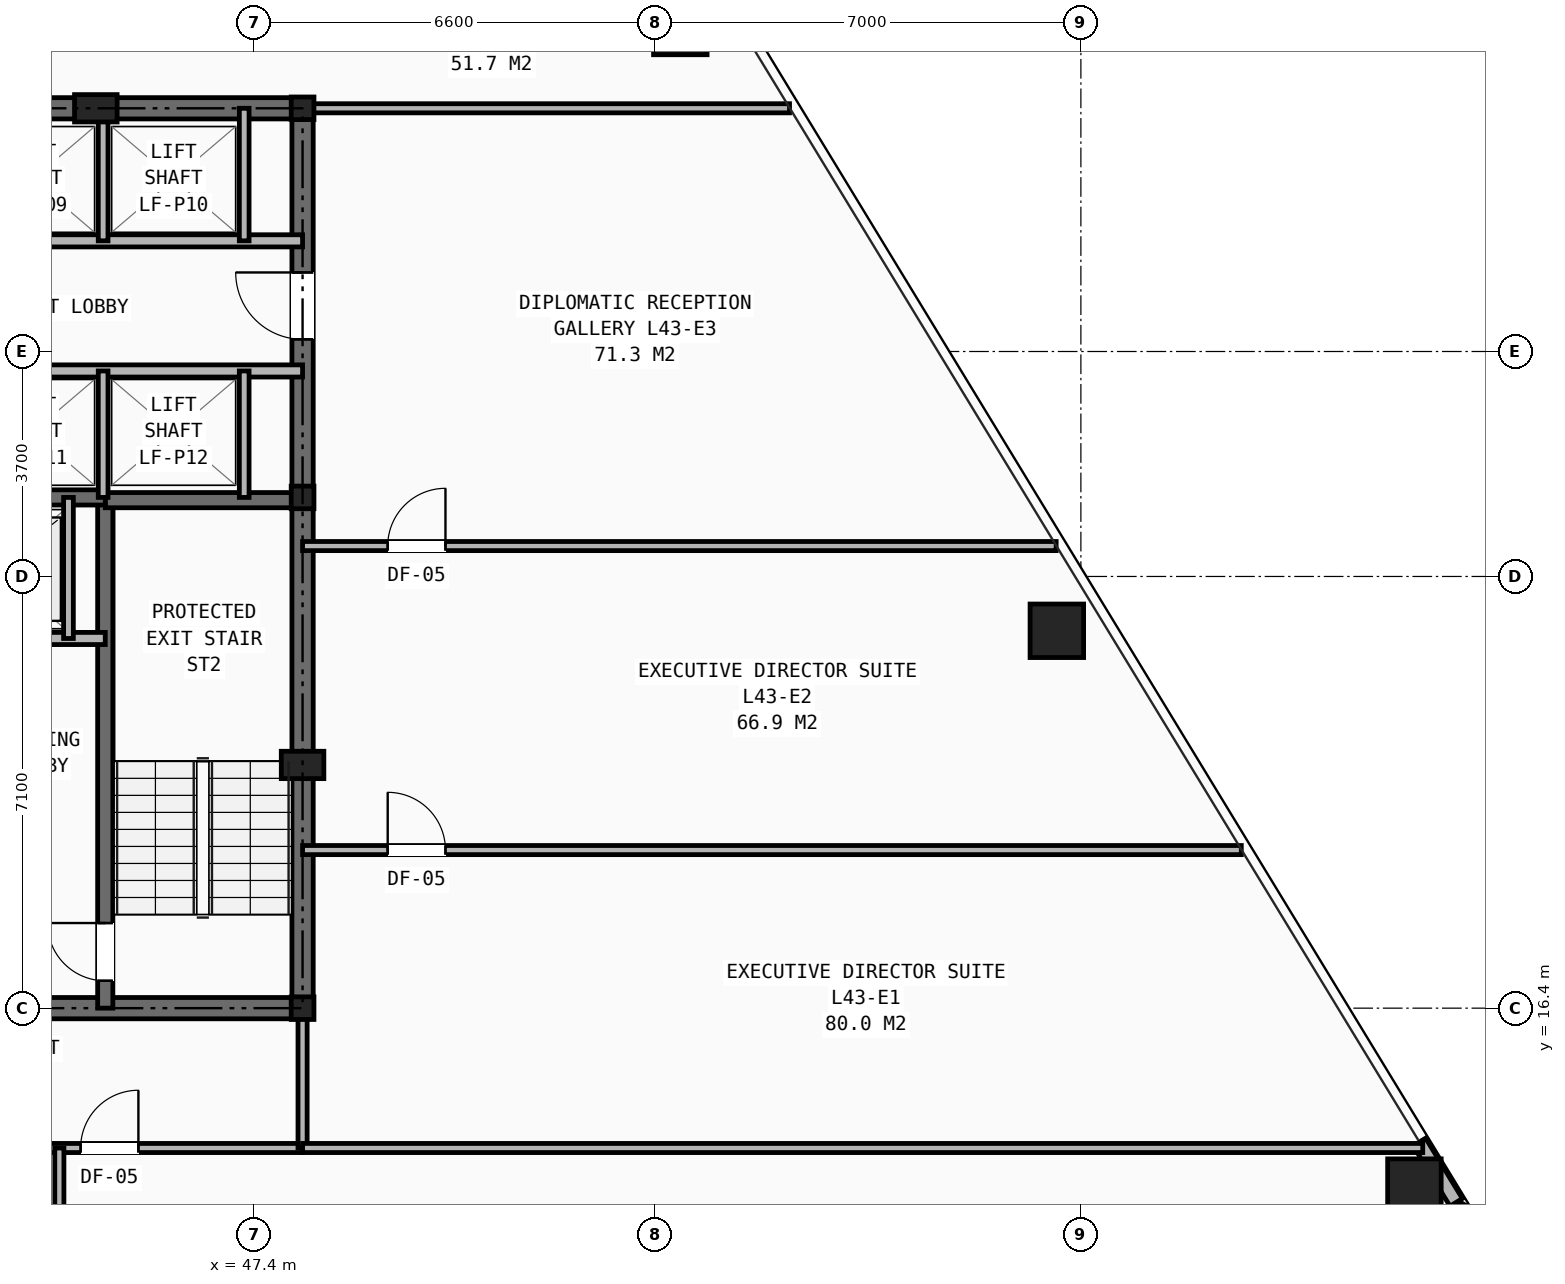
"""IFC4 building model, lengths in metres.
Left out: names, types, materials, properties, quantities, classifications, styles, units other than length and angle.
Written with IfcOpenShell. Run it as: python <this file> out.ifc"""

import sys

from ifc_helpers import new_model, si_unit, direction, frame, frame_2d, origin, origin_2d, place, context, subcontext, project, spatial, rectangle, hollow_rectangle, i_section, extrude, element, fill, save


model = new_model("IFC4")
c1 = context("Model", 3, precision=1e-05, world=origin(), true_north=direction((0.0, 1.0)))
c2 = subcontext(c1, "Body", "Model", "MODEL_VIEW")
j1 = project(units=[si_unit("LENGTHUNIT", "METRE"), si_unit("PLANEANGLEUNIT", "RADIAN")], contexts=[c1])
p1 = place(None, origin())
s1 = spatial("IfcSite", under=j1, at=p1, CompositionType="ELEMENT")
p2 = place(p1, origin())
s2 = spatial("IfcBuilding", under=s1, at=p2, CompositionType="ELEMENT")
p3 = place(p2, frame((0.0, 0.0, 150.5)))
s3 = spatial("IfcBuildingStorey", under=s2, at=p3, CompositionType="ELEMENT", Elevation=150.5)
for number, where, z_axis, x_axis in (
    (1, (48.2, 16.4, 0.0), (0.0, 0.0, 1.0), (1.0, 0.0, 0.0)),
    (2, (48.2, 24.8, 0.0), (0.0, 0.0, 1.0), (1.0, 0.0, 0.0)),
    (3, (48.2, 31.2, 0.0), (0.0, 0.0, 1.0), (1.0, 0.0, 0.0)),
):
    element("IfcColumn", number, at=place(p3, frame(where, z_axis=z_axis, x_axis=x_axis)), inside=s3, PredefinedType="COLUMN", context=c2, shape_type="SweptSolid", body=[
        extrude(i_section(OverallWidth=0.374, OverallDepth=0.372, WebThickness=0.016, FlangeThickness=0.026, at=origin_2d()), origin(), (0.0, 0.0, 1.0), 3.45),
    ])
for number, where, z_axis, x_axis in (
    (4, (48.2, 20.4, 0.0), (0.0, 0.0, 1.0), (1.0, 0.0, 0.0)),
    (5, (44.8, 31.2, 0.0), (0.0, 0.0, 1.0), (1.0, 0.0, 0.0)),
):
    element("IfcColumn", number, at=place(p3, frame(where, z_axis=z_axis, x_axis=x_axis)), inside=s3, PredefinedType="PILASTER", context=c2, shape_type="SweptSolid", body=[
        extrude(rectangle(XDim=0.7, YDim=0.45, at=origin_2d()), origin(), (0.0, 0.0, 1.0), 3.45),
    ])
for number, where, z_axis, x_axis in (
    (6, (66.485, 13.481, 0.0), (0.0, 0.0, 1.0), (1.0, 0.0, 0.0)),
    (7, (60.604, 22.606, 0.0), (0.0, 0.0, 1.0), (1.0, 0.0, 0.0)),
    (8, (54.412, 32.521, 0.0), (0.0, 0.0, 1.0), (1.0, 0.0, 0.0)),
):
    element("IfcColumn", number, at=place(p3, frame(where, z_axis=z_axis, x_axis=x_axis)), inside=s3, PredefinedType="COLUMN", context=c2, shape_type="SweptSolid", body=[
        extrude(hollow_rectangle(XDim=0.88, YDim=0.88, WallThickness=0.06, at=origin_2d()), origin(), (0.0, 0.0, 1.0), 3.45),
    ])
p4 = place(p3, frame((67.285, 13.181, 0.0), z_axis=(0.0, 0.0, 1.0), x_axis=(-0.49999135188, -0.866030396721, 0.0)))
e9 = element("IfcWall", 9, at=p4, inside=s3, PredefinedType="SHEAR", context=c2, shape_type="SweptSolid", body=[
    extrude(rectangle(XDim=8.2, YDim=0.24, at=frame_2d((4.1, 0.0))), origin(), (0.0, 0.0, 1.0), 2.583),
])
p5 = place(p3, frame((67.172, 13.206, 0.0), z_axis=(0.0, 0.0, 1.0), x_axis=(-0.520166776588, 0.854064707463, 0.0)))
e10 = element("IfcWall", 10, at=p5, inside=s3, PredefinedType="SHEAR", context=c2, shape_type="SweptSolid", body=[
    extrude(rectangle(XDim=1.163, YDim=0.24, at=frame_2d((0.581, 0.0))), origin(), (0.0, 0.0, 1.0), 2.583),
])
p6 = place(p3, frame((31.8, 16.4, 0.0), z_axis=(0.0, 0.0, 1.0), x_axis=(1.0, 0.0, 0.0)))
e11 = element("IfcWall", 11, at=p6, inside=s3, PredefinedType="SHEAR", context=c2, shape_type="SweptSolid", body=[
    extrude(rectangle(XDim=16.4, YDim=0.35, at=frame_2d((8.2, 0.0))), origin(), (0.0, 0.0, 1.0), 3.21),
])
p7 = place(p6, frame((7.75, 0.0, 0.0)))
e12 = element("IfcOpeningElement", 12, at=p7, cuts=e11, PredefinedType="OPENING", context=c2, shape_type="SweptSolid", body=[
    extrude(rectangle(XDim=0.9, YDim=2.1, at=frame_2d((0.45, 1.05))), frame((0.0, 0.185, 0.0), z_axis=(0.0, -1.0, 0.0), x_axis=(1.0, 0.0, 0.0)), (0.0, 0.0, 1.0), 0.37),
])
p8 = place(p6, frame((4.2, 0.0, 0.0)))
e13 = element("IfcOpeningElement", 13, at=p8, cuts=e11, PredefinedType="OPENING", context=c2, shape_type="SweptSolid", body=[
    extrude(rectangle(XDim=0.95, YDim=2.1, at=frame_2d((0.475, 1.05))), frame((0.0, 0.185, 0.0), z_axis=(0.0, -1.0, 0.0), x_axis=(1.0, 0.0, 0.0)), (0.0, 0.0, 1.0), 0.37),
])
p9 = place(p6, frame((10.6, 0.0, 0.0)))
e14 = element("IfcOpeningElement", 14, at=p9, cuts=e11, PredefinedType="OPENING", context=c2, shape_type="SweptSolid", body=[
    extrude(rectangle(XDim=0.95, YDim=2.1, at=frame_2d((0.475, 1.05))), frame((0.0, 0.185, 0.0), z_axis=(0.0, -1.0, 0.0), x_axis=(1.0, 0.0, 0.0)), (0.0, 0.0, 1.0), 0.37),
])
p10 = place(p3, frame((31.8, 31.2, 0.0), z_axis=(0.0, 0.0, 1.0), x_axis=(1.0, 0.0, 0.0)))
e15 = element("IfcWall", 15, at=p10, inside=s3, PredefinedType="SHEAR", context=c2, shape_type="SweptSolid", body=[
    extrude(rectangle(XDim=16.4, YDim=0.35, at=frame_2d((8.2, 0.0))), origin(), (0.0, 0.0, 1.0), 3.21),
])
p11 = place(p3, frame((48.2, 16.4, 0.0), z_axis=(0.0, 0.0, 1.0), x_axis=(0.0, 1.0, 0.0)))
e16 = element("IfcWall", 16, at=p11, inside=s3, PredefinedType="SHEAR", context=c2, shape_type="SweptSolid", body=[
    extrude(rectangle(XDim=14.8, YDim=0.35, at=frame_2d((7.4, 0.0))), origin(), (0.0, 0.0, 1.0), 3.21),
])
p12 = place(p11, frame((11.0, 0.0, 0.0)))
e17 = element("IfcOpeningElement", 17, at=p12, cuts=e16, PredefinedType="OPENING", context=c2, shape_type="SweptSolid", body=[
    extrude(rectangle(XDim=1.1, YDim=2.15, at=frame_2d((0.55, 1.075))), frame((0.0, 0.185, 0.0), z_axis=(0.0, -1.0, 0.0), x_axis=(1.0, 0.0, 0.0)), (0.0, 0.0, 1.0), 0.37),
])
p13 = place(p3, frame((44.955, 16.4, 0.0), z_axis=(0.0, 0.0, 1.0), x_axis=(0.0, 1.0, 0.0)))
e18 = element("IfcWall", 18, at=p13, inside=s3, PredefinedType="SHEAR", context=c2, shape_type="SweptSolid", body=[
    extrude(rectangle(XDim=8.4, YDim=0.25, at=frame_2d((4.2, 0.0))), origin(), (0.0, 0.0, 1.0), 3.21),
])
p14 = place(p13, frame((0.45, 0.0, 0.0)))
e19 = element("IfcOpeningElement", 19, at=p14, cuts=e18, PredefinedType="OPENING", context=c2, shape_type="SweptSolid", body=[
    extrude(rectangle(XDim=0.95, YDim=2.1, at=frame_2d((0.475, 1.05))), frame((0.0, 0.135, 0.0), z_axis=(0.0, -1.0, 0.0), x_axis=(1.0, 0.0, 0.0)), (0.0, 0.0, 1.0), 0.27),
])
p15 = place(p3, frame((44.955, 24.755, 0.0), z_axis=(0.0, 0.0, 1.0), x_axis=(1.0, 0.0, 0.0)))
e20 = element("IfcWall", 20, at=p15, inside=s3, PredefinedType="SHEAR", context=c2, shape_type="SweptSolid", body=[
    extrude(rectangle(XDim=3.245, YDim=0.25, at=frame_2d((1.623, 0.0))), origin(), (0.0, 0.0, 1.0), 3.21),
])
p16 = place(p3, frame((35.045, 24.8, 0.0), z_axis=(0.0, 0.0, 1.0), x_axis=(1.0, 0.0, 0.0)))
e21 = element("IfcWall", 21, at=p16, inside=s3, PredefinedType="SHEAR", context=c2, shape_type="SweptSolid", body=[
    extrude(rectangle(XDim=9.91, YDim=0.25, at=frame_2d((4.955, 0.0))), origin(), (0.0, 0.0, 1.0), 3.21),
])
p17 = place(p3, frame((35.045, 22.48, 0.0), z_axis=(0.0, 0.0, 1.0), x_axis=(1.0, 0.0, 0.0)))
e22 = element("IfcWall", 22, at=p17, inside=s3, PredefinedType="SOLIDWALL", context=c2, shape_type="SweptSolid", body=[
    extrude(rectangle(XDim=9.91, YDim=0.2, at=frame_2d((4.955, 0.0))), origin(), (0.0, 0.0, 1.0), 3.21),
])
p18 = place(p17, frame((1.255, 0.0, 0.0)))
e23 = element("IfcOpeningElement", 23, at=p18, cuts=e22, PredefinedType="OPENING", context=c2, shape_type="SweptSolid", body=[
    extrude(rectangle(XDim=1.1, YDim=2.15, at=frame_2d((0.55, 1.075))), frame((0.0, 0.11, 0.0), z_axis=(0.0, -1.0, 0.0), x_axis=(1.0, 0.0, 0.0)), (0.0, 0.0, 1.0), 0.22),
])
p19 = place(p17, frame((7.555, 0.0, 0.0)))
e24 = element("IfcOpeningElement", 24, at=p19, cuts=e22, PredefinedType="OPENING", context=c2, shape_type="SweptSolid", body=[
    extrude(rectangle(XDim=1.1, YDim=2.15, at=frame_2d((0.55, 1.075))), frame((0.0, 0.11, 0.0), z_axis=(0.0, -1.0, 0.0), x_axis=(1.0, 0.0, 0.0)), (0.0, 0.0, 1.0), 0.22),
])
p20 = place(p17, frame((4.405, 0.0, 0.0)))
e25 = element("IfcOpeningElement", 25, at=p20, cuts=e22, PredefinedType="OPENING", context=c2, shape_type="SweptSolid", body=[
    extrude(rectangle(XDim=1.1, YDim=2.15, at=frame_2d((0.55, 1.075))), frame((0.0, 0.11, 0.0), z_axis=(0.0, -1.0, 0.0), x_axis=(1.0, 0.0, 0.0)), (0.0, 0.0, 1.0), 0.22),
])
p21 = place(p3, frame((44.35, 22.48, 0.0), z_axis=(0.0, 0.0, 1.0), x_axis=(0.0, 1.0, 0.0)))
e26 = element("IfcWall", 26, at=p21, inside=s3, PredefinedType="SOLIDWALL", context=c2, shape_type="SweptSolid", body=[
    extrude(rectangle(XDim=2.32, YDim=0.16, at=frame_2d((1.16, 0.0))), origin(), (0.0, 0.0, 1.0), 3.21),
])
p22 = place(p3, frame((31.8, 29.02, 0.0), z_axis=(0.0, 0.0, 1.0), x_axis=(1.0, 0.0, 0.0)))
e27 = element("IfcWall", 27, at=p22, inside=s3, PredefinedType="SOLIDWALL", context=c2, shape_type="SweptSolid", body=[
    extrude(rectangle(XDim=16.4, YDim=0.2, at=frame_2d((8.2, 0.0))), origin(), (0.0, 0.0, 1.0), 2.661),
])
p23 = place(p22, frame((0.55, 0.0, 0.0)))
e28 = element("IfcOpeningElement", 28, at=p23, cuts=e27, PredefinedType="OPENING", context=c2, shape_type="SweptSolid", body=[
    extrude(rectangle(XDim=0.85, YDim=2.05, at=frame_2d((0.425, 1.025))), frame((0.0, 0.11, 0.0), z_axis=(0.0, -1.0, 0.0), x_axis=(1.0, 0.0, 0.0)), (0.0, 0.0, 1.0), 0.22),
])
p24 = place(p22, frame((5.94, 0.0, 0.0)))
e29 = element("IfcOpeningElement", 29, at=p24, cuts=e27, PredefinedType="OPENING", context=c2, shape_type="SweptSolid", body=[
    extrude(rectangle(XDim=0.9, YDim=2.1, at=frame_2d((0.45, 1.05))), frame((0.0, 0.11, 0.0), z_axis=(0.0, -1.0, 0.0), x_axis=(1.0, 0.0, 0.0)), (0.0, 0.0, 1.0), 0.22),
])
p25 = place(p3, frame((31.8, 26.88, 0.0), z_axis=(0.0, 0.0, 1.0), x_axis=(1.0, 0.0, 0.0)))
e30 = element("IfcWall", 30, at=p25, inside=s3, PredefinedType="SOLIDWALL", context=c2, shape_type="SweptSolid", body=[
    extrude(rectangle(XDim=16.4, YDim=0.2, at=frame_2d((8.2, 0.0))), origin(), (0.0, 0.0, 1.0), 2.661),
])
p26 = place(p25, frame((0.55, 0.0, 0.0)))
e31 = element("IfcOpeningElement", 31, at=p26, cuts=e30, PredefinedType="OPENING", context=c2, shape_type="SweptSolid", body=[
    extrude(rectangle(XDim=0.85, YDim=2.05, at=frame_2d((0.425, 1.025))), frame((0.0, 0.11, 0.0), z_axis=(0.0, -1.0, 0.0), x_axis=(1.0, 0.0, 0.0)), (0.0, 0.0, 1.0), 0.22),
])
p27 = place(p25, frame((2.55, 0.0, 0.0)))
e32 = element("IfcOpeningElement", 32, at=p27, cuts=e30, PredefinedType="OPENING", context=c2, shape_type="SweptSolid", body=[
    extrude(rectangle(XDim=1.1, YDim=2.15, at=frame_2d((0.55, 1.075))), frame((0.0, 0.11, 0.0), z_axis=(0.0, -1.0, 0.0), x_axis=(1.0, 0.0, 0.0)), (0.0, 0.0, 1.0), 0.22),
])
p28 = place(p25, frame((4.71, 0.0, 0.0)))
e33 = element("IfcOpeningElement", 33, at=p28, cuts=e30, PredefinedType="OPENING", context=c2, shape_type="SweptSolid", body=[
    extrude(rectangle(XDim=1.1, YDim=2.15, at=frame_2d((0.55, 1.075))), frame((0.0, 0.11, 0.0), z_axis=(0.0, -1.0, 0.0), x_axis=(1.0, 0.0, 0.0)), (0.0, 0.0, 1.0), 0.22),
])
p29 = place(p25, frame((6.87, 0.0, 0.0)))
e34 = element("IfcOpeningElement", 34, at=p29, cuts=e30, PredefinedType="OPENING", context=c2, shape_type="SweptSolid", body=[
    extrude(rectangle(XDim=1.1, YDim=2.15, at=frame_2d((0.55, 1.075))), frame((0.0, 0.11, 0.0), z_axis=(0.0, -1.0, 0.0), x_axis=(1.0, 0.0, 0.0)), (0.0, 0.0, 1.0), 0.22),
])
p30 = place(p25, frame((9.03, 0.0, 0.0)))
e35 = element("IfcOpeningElement", 35, at=p30, cuts=e30, PredefinedType="OPENING", context=c2, shape_type="SweptSolid", body=[
    extrude(rectangle(XDim=1.1, YDim=2.15, at=frame_2d((0.55, 1.075))), frame((0.0, 0.11, 0.0), z_axis=(0.0, -1.0, 0.0), x_axis=(1.0, 0.0, 0.0)), (0.0, 0.0, 1.0), 0.22),
])
for number, where, z_axis, x_axis in (
    (36, (44.92, 29.02, 0.0), (0.0, 0.0, 1.0), (0.0, 1.0, 0.0)),
    (37, (47.24, 29.02, 0.0), (0.0, 0.0, 1.0), (0.0, 1.0, 0.0)),
):
    element("IfcWall", number, at=place(p3, frame(where, z_axis=z_axis, x_axis=x_axis)), inside=s3, PredefinedType="SOLIDWALL", context=c2, shape_type="SweptSolid", body=[
        extrude(rectangle(XDim=2.18, YDim=0.16, at=frame_2d((1.09, 0.0))), origin(), (0.0, 0.0, 1.0), 2.661),
    ])
for number, where, z_axis, x_axis in (
    (38, (44.92, 24.8, 0.0), (0.0, 0.0, 1.0), (0.0, 1.0, 0.0)),
    (39, (47.24, 24.8, 0.0), (0.0, 0.0, 1.0), (0.0, 1.0, 0.0)),
):
    element("IfcWall", number, at=place(p3, frame(where, z_axis=z_axis, x_axis=x_axis)), inside=s3, PredefinedType="SOLIDWALL", context=c2, shape_type="SweptSolid", body=[
        extrude(rectangle(XDim=2.08, YDim=0.16, at=frame_2d((1.04, 0.0))), origin(), (0.0, 0.0, 1.0), 3.21),
    ])
p31 = place(p3, frame((29.6, 14.1, 0.0), z_axis=(0.0, 0.0, 1.0), x_axis=(1.0, 0.0, 0.0)))
e40 = element("IfcWall", 40, at=p31, inside=s3, PredefinedType="PARTITIONING", context=c2, shape_type="SweptSolid", body=[
    extrude(rectangle(XDim=18.6, YDim=0.15, at=frame_2d((9.3, 0.0))), origin(), (0.0, 0.0, 1.0), 2.252),
])
p32 = place(p31, frame((0.55, 0.0, 0.0)))
e41 = element("IfcOpeningElement", 41, at=p32, cuts=e40, PredefinedType="OPENING", context=c2, shape_type="SweptSolid", body=[
    extrude(rectangle(XDim=0.95, YDim=2.1, at=frame_2d((0.475, 1.05))), frame((0.0, 0.085, 0.0), z_axis=(0.0, -1.0, 0.0), x_axis=(1.0, 0.0, 0.0)), (0.0, 0.0, 1.0), 0.17),
])
p33 = place(p31, frame((4.75, 0.0, 0.0)))
e42 = element("IfcOpeningElement", 42, at=p33, cuts=e40, PredefinedType="OPENING", context=c2, shape_type="SweptSolid", body=[
    extrude(rectangle(XDim=0.95, YDim=2.1, at=frame_2d((0.475, 1.05))), frame((0.0, 0.085, 0.0), z_axis=(0.0, -1.0, 0.0), x_axis=(1.0, 0.0, 0.0)), (0.0, 0.0, 1.0), 0.17),
])
p34 = place(p31, frame((9.95, 0.0, 0.0)))
e43 = element("IfcOpeningElement", 43, at=p34, cuts=e40, PredefinedType="OPENING", context=c2, shape_type="SweptSolid", body=[
    extrude(rectangle(XDim=0.95, YDim=2.1, at=frame_2d((0.475, 1.05))), frame((0.0, 0.085, 0.0), z_axis=(0.0, -1.0, 0.0), x_axis=(1.0, 0.0, 0.0)), (0.0, 0.0, 1.0), 0.17),
])
p35 = place(p31, frame((14.95, 0.0, 0.0)))
e44 = element("IfcOpeningElement", 44, at=p35, cuts=e40, PredefinedType="OPENING", context=c2, shape_type="SweptSolid", body=[
    extrude(rectangle(XDim=0.95, YDim=2.1, at=frame_2d((0.475, 1.05))), frame((0.0, 0.085, 0.0), z_axis=(0.0, -1.0, 0.0), x_axis=(1.0, 0.0, 0.0)), (0.0, 0.0, 1.0), 0.17),
])
p36 = place(p3, frame((48.2, 14.1, 0.0), z_axis=(0.0, 0.0, 1.0), x_axis=(0.0, 1.0, 0.0)))
e45 = element("IfcWall", 45, at=p36, inside=s3, PredefinedType="PARTITIONING", context=c2, shape_type="SweptSolid", body=[
    extrude(rectangle(XDim=2.3, YDim=0.15, at=frame_2d((1.15, 0.0))), origin(), (0.0, 0.0, 1.0), 2.661),
])
p37 = place(p3, frame((44.2, 6.613, 0.0), z_axis=(0.0, 0.0, 1.0), x_axis=(0.0, 1.0, 0.0)))
e46 = element("IfcWall", 46, at=p37, inside=s3, PredefinedType="PARTITIONING", context=c2, shape_type="SweptSolid", body=[
    extrude(rectangle(XDim=7.487, YDim=0.15, at=frame_2d((3.744, 0.0))), origin(), (0.0, 0.0, 1.0), 2.589),
])
p38 = place(p3, frame((48.2, 31.2, 0.0), z_axis=(0.0, 0.0, 1.0), x_axis=(1.0, 0.0, 0.0)))
e47 = element("IfcWall", 47, at=p38, inside=s3, PredefinedType="PARTITIONING", context=c2, shape_type="SweptSolid", body=[
    extrude(rectangle(XDim=8.008, YDim=0.15, at=frame_2d((4.004, 0.0))), origin(), (0.0, 0.0, 1.0), 2.252),
])
p39 = place(p3, frame((48.2, 14.1, 0.0), z_axis=(0.0, 0.0, 1.0), x_axis=(1.0, 0.0, 0.0)))
e48 = element("IfcWall", 48, at=p39, inside=s3, PredefinedType="PARTITIONING", context=c2, shape_type="SweptSolid", body=[
    extrude(rectangle(XDim=18.422, YDim=0.15, at=frame_2d((9.211, 0.0))), origin(), (0.0, 0.0, 1.0), 2.589),
])
p40 = place(p3, frame((48.2, 19.0, 0.0), z_axis=(0.0, 0.0, 1.0), x_axis=(1.0, 0.0, 0.0)))
e49 = element("IfcWall", 49, at=p40, inside=s3, PredefinedType="PARTITIONING", context=c2, shape_type="SweptSolid", body=[
    extrude(rectangle(XDim=15.438, YDim=0.15, at=frame_2d((7.719, 0.0))), origin(), (0.0, 0.0, 1.0), 2.589),
])
p41 = place(p40, frame((1.4, 0.0, 0.0)))
e50 = element("IfcOpeningElement", 50, at=p41, cuts=e49, PredefinedType="OPENING", context=c2, shape_type="SweptSolid", body=[
    extrude(rectangle(XDim=0.95, YDim=2.1, at=frame_2d((0.475, 1.05))), frame((0.0, 0.085, 0.0), z_axis=(0.0, -1.0, 0.0), x_axis=(1.0, 0.0, 0.0)), (0.0, 0.0, 1.0), 0.17),
])
p42 = place(p3, frame((48.2, 24.0, 0.0), z_axis=(0.0, 0.0, 1.0), x_axis=(1.0, 0.0, 0.0)))
e51 = element("IfcWall", 51, at=p42, inside=s3, PredefinedType="PARTITIONING", context=c2, shape_type="SweptSolid", body=[
    extrude(rectangle(XDim=12.393, YDim=0.15, at=frame_2d((6.197, 0.0))), origin(), (0.0, 0.0, 1.0), 2.589),
])
p43 = place(p42, frame((1.4, 0.0, 0.0)))
e52 = element("IfcOpeningElement", 52, at=p43, cuts=e51, PredefinedType="OPENING", context=c2, shape_type="SweptSolid", body=[
    extrude(rectangle(XDim=0.95, YDim=2.1, at=frame_2d((0.475, 1.05))), frame((0.0, 0.085, 0.0), z_axis=(0.0, -1.0, 0.0), x_axis=(1.0, 0.0, 0.0)), (0.0, 0.0, 1.0), 0.17),
])
p44 = place(p14, origin())
e53 = element("IfcDoor", 53, at=p44, inside=s3, OperationType="SINGLE_SWING_RIGHT", PredefinedType="DOOR", context=c2, shape_type="SweptSolid", body=[
    extrude(rectangle(XDim=0.95, YDim=2.1, at=frame_2d((0.475, 1.05))), frame((0.0, 0.025, 0.0), z_axis=(0.0, -1.0, 0.0), x_axis=(1.0, 0.0, 0.0)), (0.0, 0.0, 1.0), 0.05),
])
fill(e19, e53)
p45 = place(p12, origin())
e54 = element("IfcDoor", 54, at=p45, inside=s3, OperationType="SINGLE_SWING_RIGHT", PredefinedType="DOOR", context=c2, shape_type="SweptSolid", body=[
    extrude(rectangle(XDim=1.1, YDim=2.15, at=frame_2d((0.55, 1.075))), frame((0.0, 0.025, 0.0), z_axis=(0.0, -1.0, 0.0), x_axis=(1.0, 0.0, 0.0)), (0.0, 0.0, 1.0), 0.05),
])
fill(e17, e54)
p46 = place(p35, origin())
e55 = element("IfcDoor", 55, at=p46, inside=s3, OperationType="SINGLE_SWING_RIGHT", PredefinedType="DOOR", context=c2, shape_type="SweptSolid", body=[
    extrude(rectangle(XDim=0.95, YDim=2.1, at=frame_2d((0.475, 1.05))), frame((0.0, 0.025, 0.0), z_axis=(0.0, -1.0, 0.0), x_axis=(1.0, 0.0, 0.0)), (0.0, 0.0, 1.0), 0.05),
])
fill(e44, e55)
p47 = place(p41, origin())
e56 = element("IfcDoor", 56, at=p47, inside=s3, OperationType="SINGLE_SWING_LEFT", PredefinedType="DOOR", context=c2, shape_type="SweptSolid", body=[
    extrude(rectangle(XDim=0.95, YDim=2.1, at=frame_2d((0.475, 1.05))), frame((0.0, 0.025, 0.0), z_axis=(0.0, -1.0, 0.0), x_axis=(1.0, 0.0, 0.0)), (0.0, 0.0, 1.0), 0.05),
])
fill(e50, e56)
p48 = place(p43, origin())
e57 = element("IfcDoor", 57, at=p48, inside=s3, OperationType="SINGLE_SWING_RIGHT", PredefinedType="DOOR", context=c2, shape_type="SweptSolid", body=[
    extrude(rectangle(XDim=0.95, YDim=2.1, at=frame_2d((0.475, 1.05))), frame((0.0, 0.025, 0.0), z_axis=(0.0, -1.0, 0.0), x_axis=(1.0, 0.0, 0.0)), (0.0, 0.0, 1.0), 0.05),
])
fill(e52, e57)
save(model, sys.argv[1])
